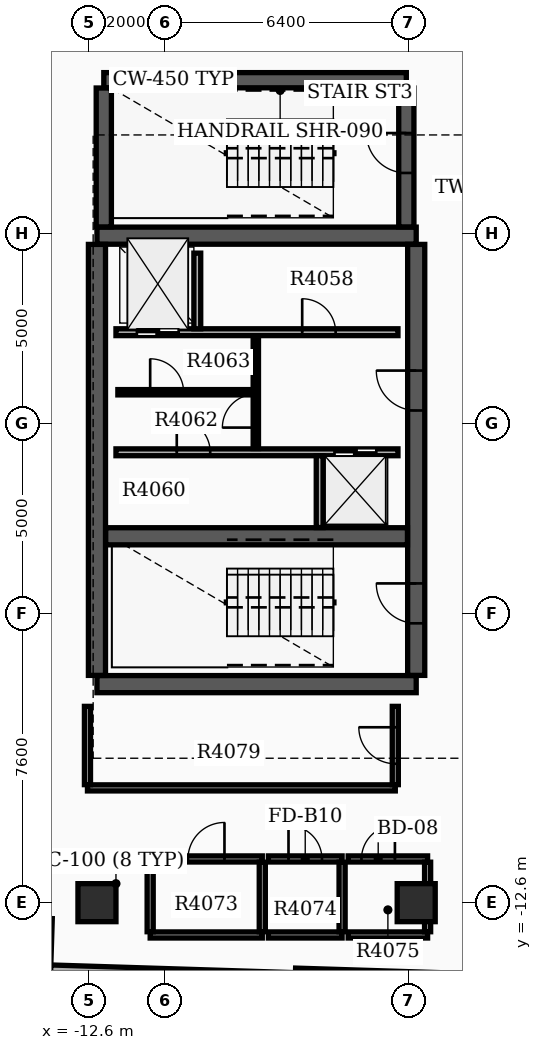
"""IFC4 building model, lengths in metres.
Left out: names, types, materials, properties, quantities, classifications, styles, units other than length and angle.
Written with IfcOpenShell. Run it as: python <this file> out.ifc"""

import sys

from ifc_helpers import new_model, si_unit, direction, frame, frame_2d, origin, origin_2d, place, context, subcontext, project, spatial, rectangle, extrude, element, fill, save


model = new_model("IFC4")
c1 = context("Model", 3, precision=1e-05, world=origin(), true_north=direction((0.0, 1.0)))
c2 = subcontext(c1, "Body", "Model", "MODEL_VIEW")
j1 = project(units=[si_unit("LENGTHUNIT", "METRE"), si_unit("PLANEANGLEUNIT", "RADIAN")], contexts=[c1])
p1 = place(None, origin())
s1 = spatial("IfcSite", under=j1, at=p1, CompositionType="ELEMENT")
p2 = place(p1, origin())
s2 = spatial("IfcBuilding", under=s1, at=p2, CompositionType="ELEMENT")
p3 = place(p2, frame((0.0, 0.0, 257.7)))
s3 = spatial("IfcBuildingStorey", under=s2, at=p3, CompositionType="ELEMENT", Elevation=257.7)
for number, where, z_axis, x_axis in (
    (1, (-12.4, -6.85, 0.0), (0.0, 0.0, 1.0), (1.0, 0.0, 0.0)),
    (2, (-12.4, 4.95, 0.0), (0.0, 0.0, 1.0), (1.0, 0.0, 0.0)),
):
    element("IfcWall", number, at=place(p3, frame(where, z_axis=z_axis, x_axis=x_axis)), inside=s3, PredefinedType="SHEAR", context=c2, shape_type="SweptSolid", body=[
        extrude(rectangle(XDim=8.4, YDim=0.45, at=frame_2d((4.2, 0.0))), origin(), (0.0, 0.0, 1.0), 3.7),
    ])
p4 = place(p3, frame((-12.4, -6.62, 0.0), z_axis=(0.0, 0.0, 1.0), x_axis=(0.0, 1.0, 0.0)))
e3 = element("IfcWall", 3, at=p4, inside=s3, PredefinedType="SHEAR", context=c2, shape_type="SweptSolid", body=[
    extrude(rectangle(XDim=11.34, YDim=0.45, at=frame_2d((5.67, 0.0))), origin(), (0.0, 0.0, 1.0), 3.7),
])
p5 = place(p3, frame((-4.0, -6.62, 0.0), z_axis=(0.0, 0.0, 1.0), x_axis=(0.0, 1.0, 0.0)))
e4 = element("IfcWall", 4, at=p5, inside=s3, PredefinedType="SHEAR", context=c2, shape_type="SweptSolid", body=[
    extrude(rectangle(XDim=11.34, YDim=0.45, at=frame_2d((5.67, 0.0))), origin(), (0.0, 0.0, 1.0), 3.7),
])
p6 = place(p5, frame((1.37, 0.0, 0.0)))
e5 = element("IfcOpeningElement", 5, at=p6, cuts=e4, PredefinedType="OPENING", context=c2, shape_type="SweptSolid", body=[
    extrude(rectangle(XDim=1.05, YDim=2.15, at=frame_2d((0.525, 1.075))), frame((0.0, 0.235, 0.0), z_axis=(0.0, -1.0, 0.0), x_axis=(1.0, 0.0, 0.0)), (0.0, 0.0, 1.0), 0.47),
])
p7 = place(p5, frame((6.97, 0.0, 0.0)))
e6 = element("IfcOpeningElement", 6, at=p7, cuts=e4, PredefinedType="OPENING", context=c2, shape_type="SweptSolid", body=[
    extrude(rectangle(XDim=1.05, YDim=2.15, at=frame_2d((0.525, 1.075))), frame((0.0, 0.235, 0.0), z_axis=(0.0, -1.0, 0.0), x_axis=(1.0, 0.0, 0.0)), (0.0, 0.0, 1.0), 0.47),
])
p8 = place(p3, frame((-12.17, -2.96, 0.0), z_axis=(0.0, 0.0, 1.0), x_axis=(1.0, 0.0, 0.0)))
e7 = element("IfcWall", 7, at=p8, inside=s3, PredefinedType="SHEAR", context=c2, shape_type="SweptSolid", body=[
    extrude(rectangle(XDim=7.94, YDim=0.45, at=frame_2d((3.97, 0.0))), origin(), (0.0, 0.0, 1.0), 3.7),
])
p9 = place(p3, frame((-12.22, 9.04, 0.0), z_axis=(0.0, 0.0, 1.0), x_axis=(1.0, 0.0, 0.0)))
e8 = element("IfcWall", 8, at=p9, inside=s3, PredefinedType="SHEAR", context=c2, shape_type="SweptSolid", body=[
    extrude(rectangle(XDim=7.96, YDim=0.4, at=frame_2d((3.98, 0.0))), origin(), (0.0, 0.0, 1.0), 3.7),
])
p10 = place(p3, frame((-12.22, 5.18, 0.0), z_axis=(0.0, 0.0, 1.0), x_axis=(0.0, 1.0, 0.0)))
e9 = element("IfcWall", 9, at=p10, inside=s3, PredefinedType="SHEAR", context=c2, shape_type="SweptSolid", body=[
    extrude(rectangle(XDim=3.655, YDim=0.4, at=frame_2d((1.828, 0.0))), origin(), (0.0, 0.0, 1.0), 3.7),
])
p11 = place(p3, frame((-4.26, 5.18, 0.0), z_axis=(0.0, 0.0, 1.0), x_axis=(0.0, 1.0, 0.0)))
e10 = element("IfcWall", 10, at=p11, inside=s3, PredefinedType="SHEAR", context=c2, shape_type="SweptSolid", body=[
    extrude(rectangle(XDim=3.655, YDim=0.4, at=frame_2d((1.828, 0.0))), origin(), (0.0, 0.0, 1.0), 3.7),
])
p12 = place(p11, frame((1.42, 0.0, 0.0)))
e11 = element("IfcOpeningElement", 11, at=p12, cuts=e10, PredefinedType="OPENING", context=c2, shape_type="SweptSolid", body=[
    extrude(rectangle(XDim=1.05, YDim=2.15, at=frame_2d((0.525, 1.075))), frame((0.0, 0.21, 0.0), z_axis=(0.0, -1.0, 0.0), x_axis=(1.0, 0.0, 0.0)), (0.0, 0.0, 1.0), 0.42),
])
for number, where, z_axis, x_axis in (
    (12, (-12.4, -12.6, 0.0), (0.0, 0.0, 1.0), (1.0, 0.0, 0.0)),
    (13, (-4.0, -12.6, 0.0), (0.0, 0.0, 1.0), (1.0, 0.0, 0.0)),
):
    element("IfcColumn", number, at=place(p3, frame(where, z_axis=z_axis, x_axis=x_axis)), inside=s3, PredefinedType="COLUMN", context=c2, shape_type="SweptSolid", body=[
        extrude(rectangle(XDim=1.0, YDim=1.0, at=origin_2d()), origin(), (0.0, 0.0, 1.0), 3.9),
    ])
p13 = place(p3, frame((-13.618, -14.379, 0.0), z_axis=(0.0, 0.0, 1.0), x_axis=(0.999507224741, -0.031389611199, 0.0)))
e14 = element("IfcWall", 14, at=p13, inside=s3, PredefinedType="STANDARD", context=c2, shape_type="SweptSolid", body=[
    extrude(rectangle(XDim=6.3, YDim=0.28, at=frame_2d((3.15, 0.0))), origin(), (0.0, 0.0, 1.0), 3.18),
])
p14 = place(p3, frame((-11.9, 2.41, 0.0), z_axis=(0.0, 0.0, 1.0), x_axis=(1.0, 0.0, 0.0)))
e15 = element("IfcWall", 15, at=p14, inside=s3, PredefinedType="SOLIDWALL", context=c2, shape_type="SweptSolid", body=[
    extrude(rectangle(XDim=7.42, YDim=0.18, at=frame_2d((3.71, 0.0))), origin(), (0.0, 0.0, 1.0), 3.17),
])
p15 = place(p14, frame((0.55, 0.0, 0.0)))
e16 = element("IfcOpeningElement", 16, at=p15, cuts=e15, PredefinedType="OPENING", context=c2, shape_type="SweptSolid", body=[
    extrude(rectangle(XDim=1.1, YDim=2.15, at=frame_2d((0.55, 1.075))), frame((0.0, 0.1, 0.0), z_axis=(0.0, -1.0, 0.0), x_axis=(1.0, 0.0, 0.0)), (0.0, 0.0, 1.0), 0.2),
])
p16 = place(p14, frame((4.9, 0.0, 0.0)))
e17 = element("IfcOpeningElement", 17, at=p16, cuts=e15, PredefinedType="OPENING", context=c2, shape_type="SweptSolid", body=[
    extrude(rectangle(XDim=0.88, YDim=2.1, at=frame_2d((0.44, 1.05))), frame((0.0, 0.1, 0.0), z_axis=(0.0, -1.0, 0.0), x_axis=(1.0, 0.0, 0.0)), (0.0, 0.0, 1.0), 0.2),
])
p17 = place(p3, frame((-11.9, -0.75, 0.0), z_axis=(0.0, 0.0, 1.0), x_axis=(1.0, 0.0, 0.0)))
e18 = element("IfcWall", 18, at=p17, inside=s3, PredefinedType="SOLIDWALL", context=c2, shape_type="SweptSolid", body=[
    extrude(rectangle(XDim=7.42, YDim=0.18, at=frame_2d((3.71, 0.0))), origin(), (0.0, 0.0, 1.0), 3.17),
])
p18 = place(p17, frame((5.75, 0.0, 0.0)))
e19 = element("IfcOpeningElement", 19, at=p18, cuts=e18, PredefinedType="OPENING", context=c2, shape_type="SweptSolid", body=[
    extrude(rectangle(XDim=1.1, YDim=2.15, at=frame_2d((0.55, 1.075))), frame((0.0, 0.1, 0.0), z_axis=(0.0, -1.0, 0.0), x_axis=(1.0, 0.0, 0.0)), (0.0, 0.0, 1.0), 0.2),
])
p19 = place(p17, frame((1.6, 0.0, 0.0)))
e20 = element("IfcOpeningElement", 20, at=p19, cuts=e18, PredefinedType="OPENING", context=c2, shape_type="SweptSolid", body=[
    extrude(rectangle(XDim=0.88, YDim=2.1, at=frame_2d((0.44, 1.05))), frame((0.0, 0.1, 0.0), z_axis=(0.0, -1.0, 0.0), x_axis=(1.0, 0.0, 0.0)), (0.0, 0.0, 1.0), 0.2),
])
p20 = place(p3, frame((-9.76, 2.5, 0.0), z_axis=(0.0, 0.0, 1.0), x_axis=(0.0, 1.0, 0.0)))
e21 = element("IfcWall", 21, at=p20, inside=s3, PredefinedType="SOLIDWALL", context=c2, shape_type="SweptSolid", body=[
    extrude(rectangle(XDim=1.99, YDim=0.18, at=frame_2d((0.995, 0.0))), origin(), (0.0, 0.0, 1.0), 3.17),
])
p21 = place(p3, frame((-6.54, -2.73, 0.0), z_axis=(0.0, 0.0, 1.0), x_axis=(0.0, 1.0, 0.0)))
e22 = element("IfcWall", 22, at=p21, inside=s3, PredefinedType="SOLIDWALL", context=c2, shape_type="SweptSolid", body=[
    extrude(rectangle(XDim=1.89, YDim=0.18, at=frame_2d((0.945, 0.0))), origin(), (0.0, 0.0, 1.0), 3.17),
])
p22 = place(p3, frame((-8.22, -0.65, 0.0), z_axis=(0.0, 0.0, 1.0), x_axis=(0.0, 1.0, 0.0)))
e23 = element("IfcWall", 23, at=p22, inside=s3, PredefinedType="SOLIDWALL", context=c2, shape_type="SweptSolid", body=[
    extrude(rectangle(XDim=2.96, YDim=0.14, at=frame_2d((1.48, 0.0))), origin(), (0.0, 0.0, 1.0), 3.17),
])
p23 = place(p22, frame((0.55, 0.0, 0.0)))
e24 = element("IfcOpeningElement", 24, at=p23, cuts=e23, PredefinedType="OPENING", context=c2, shape_type="SweptSolid", body=[
    extrude(rectangle(XDim=0.88, YDim=2.1, at=frame_2d((0.44, 1.05))), frame((0.0, 0.08, 0.0), z_axis=(0.0, -1.0, 0.0), x_axis=(1.0, 0.0, 0.0)), (0.0, 0.0, 1.0), 0.16),
])
p24 = place(p3, frame((-11.85, 0.83, 0.0), z_axis=(0.0, 0.0, 1.0), x_axis=(1.0, 0.0, 0.0)))
e25 = element("IfcWall", 25, at=p24, inside=s3, PredefinedType="PARTITIONING", context=c2, shape_type="SweptSolid", body=[
    extrude(rectangle(XDim=3.552, YDim=0.14, at=frame_2d((1.776, 0.0))), origin(), (0.0, 0.0, 1.0), 3.17),
])
p25 = place(p24, frame((0.85, 0.0, 0.0)))
e26 = element("IfcOpeningElement", 26, at=p25, cuts=e25, PredefinedType="OPENING", context=c2, shape_type="SweptSolid", body=[
    extrude(rectangle(XDim=0.88, YDim=2.1, at=frame_2d((0.44, 1.05))), frame((0.0, 0.08, 0.0), z_axis=(0.0, -1.0, 0.0), x_axis=(1.0, 0.0, 0.0)), (0.0, 0.0, 1.0), 0.16),
])
p26 = place(p3, frame((-11.0, -13.45, 0.0), z_axis=(0.0, 0.0, 1.0), x_axis=(1.0, 0.0, 0.0)))
e27 = element("IfcWall", 27, at=p26, inside=s3, PredefinedType="PARTITIONING", context=c2, shape_type="SweptSolid", body=[
    extrude(rectangle(XDim=2.95, YDim=0.16, at=frame_2d((1.475, 0.0))), origin(), (0.0, 0.0, 1.0), 3.17),
])
p27 = place(p3, frame((-11.0, -11.45, 0.0), z_axis=(0.0, 0.0, 1.0), x_axis=(1.0, 0.0, 0.0)))
e28 = element("IfcWall", 28, at=p27, inside=s3, PredefinedType="PARTITIONING", context=c2, shape_type="SweptSolid", body=[
    extrude(rectangle(XDim=2.95, YDim=0.16, at=frame_2d((1.475, 0.0))), origin(), (0.0, 0.0, 1.0), 3.17),
])
p28 = place(p27, frame((0.995, 0.0, 0.0)))
e29 = element("IfcOpeningElement", 29, at=p28, cuts=e28, PredefinedType="OPENING", context=c2, shape_type="SweptSolid", body=[
    extrude(rectangle(XDim=0.96, YDim=2.15, at=frame_2d((0.48, 1.075))), frame((0.0, 0.09, 0.0), z_axis=(0.0, -1.0, 0.0), x_axis=(1.0, 0.0, 0.0)), (0.0, 0.0, 1.0), 0.18),
])
for number, where, z_axis, x_axis in (
    (30, (-11.0, -13.365, 0.0), (0.0, 0.0, 1.0), (0.0, 1.0, 0.0)),
    (31, (-8.05, -13.365, 0.0), (0.0, 0.0, 1.0), (0.0, 1.0, 0.0)),
):
    element("IfcWall", number, at=place(p3, frame(where, z_axis=z_axis, x_axis=x_axis)), inside=s3, PredefinedType="PARTITIONING", context=c2, shape_type="SweptSolid", body=[
        extrude(rectangle(XDim=1.83, YDim=0.16, at=frame_2d((0.915, 0.0))), origin(), (0.0, 0.0, 1.0), 3.17),
    ])
p29 = place(p3, frame((-7.89, -13.45, 0.0), z_axis=(0.0, 0.0, 1.0), x_axis=(1.0, 0.0, 0.0)))
e32 = element("IfcWall", 32, at=p29, inside=s3, PredefinedType="PARTITIONING", context=c2, shape_type="SweptSolid", body=[
    extrude(rectangle(XDim=1.94, YDim=0.16, at=frame_2d((0.97, 0.0))), origin(), (0.0, 0.0, 1.0), 3.17),
])
p30 = place(p3, frame((-7.89, -11.45, 0.0), z_axis=(0.0, 0.0, 1.0), x_axis=(1.0, 0.0, 0.0)))
e33 = element("IfcWall", 33, at=p30, inside=s3, PredefinedType="PARTITIONING", context=c2, shape_type="SweptSolid", body=[
    extrude(rectangle(XDim=1.94, YDim=0.16, at=frame_2d((0.97, 0.0))), origin(), (0.0, 0.0, 1.0), 3.17),
])
p31 = place(p30, frame((0.53, 0.0, 0.0)))
e34 = element("IfcOpeningElement", 34, at=p31, cuts=e33, PredefinedType="OPENING", context=c2, shape_type="SweptSolid", body=[
    extrude(rectangle(XDim=0.88, YDim=2.1, at=frame_2d((0.44, 1.05))), frame((0.0, 0.09, 0.0), z_axis=(0.0, -1.0, 0.0), x_axis=(1.0, 0.0, 0.0)), (0.0, 0.0, 1.0), 0.18),
])
p32 = place(p3, frame((-5.95, -13.365, 0.0), z_axis=(0.0, 0.0, 1.0), x_axis=(0.0, 1.0, 0.0)))
e35 = element("IfcWall", 35, at=p32, inside=s3, PredefinedType="PARTITIONING", context=c2, shape_type="SweptSolid", body=[
    extrude(rectangle(XDim=1.83, YDim=0.16, at=frame_2d((0.915, 0.0))), origin(), (0.0, 0.0, 1.0), 3.17),
])
p33 = place(p3, frame((-5.79, -13.45, 0.0), z_axis=(0.0, 0.0, 1.0), x_axis=(1.0, 0.0, 0.0)))
e36 = element("IfcWall", 36, at=p33, inside=s3, PredefinedType="PARTITIONING", context=c2, shape_type="SweptSolid", body=[
    extrude(rectangle(XDim=2.09, YDim=0.16, at=frame_2d((1.045, 0.0))), origin(), (0.0, 0.0, 1.0), 3.17),
])
p34 = place(p3, frame((-5.79, -11.45, 0.0), z_axis=(0.0, 0.0, 1.0), x_axis=(1.0, 0.0, 0.0)))
e37 = element("IfcWall", 37, at=p34, inside=s3, PredefinedType="PARTITIONING", context=c2, shape_type="SweptSolid", body=[
    extrude(rectangle(XDim=2.09, YDim=0.16, at=frame_2d((1.045, 0.0))), origin(), (0.0, 0.0, 1.0), 3.17),
])
p35 = place(p34, frame((0.35, 0.0, 0.0)))
e38 = element("IfcOpeningElement", 38, at=p35, cuts=e37, PredefinedType="OPENING", context=c2, shape_type="SweptSolid", body=[
    extrude(rectangle(XDim=0.88, YDim=2.15, at=frame_2d((0.44, 1.075))), frame((0.0, 0.09, 0.0), z_axis=(0.0, -1.0, 0.0), x_axis=(1.0, 0.0, 0.0)), (0.0, 0.0, 1.0), 0.18),
])
p36 = place(p3, frame((-3.7, -13.365, 0.0), z_axis=(0.0, 0.0, 1.0), x_axis=(0.0, 1.0, 0.0)))
e39 = element("IfcWall", 39, at=p36, inside=s3, PredefinedType="PARTITIONING", context=c2, shape_type="SweptSolid", body=[
    extrude(rectangle(XDim=1.83, YDim=0.16, at=frame_2d((0.915, 0.0))), origin(), (0.0, 0.0, 1.0), 3.17),
])
p37 = place(p3, frame((-12.65, -9.58, 0.0), z_axis=(0.0, 0.0, 1.0), x_axis=(1.0, 0.0, 0.0)))
e40 = element("IfcWall", 40, at=p37, inside=s3, PredefinedType="PARTITIONING", context=c2, shape_type="SweptSolid", body=[
    extrude(rectangle(XDim=8.1, YDim=0.16, at=frame_2d((4.05, 0.0))), origin(), (0.0, 0.0, 1.0), 3.17),
])
p38 = place(p3, frame((-12.65, -9.495, 0.0), z_axis=(0.0, 0.0, 1.0), x_axis=(0.0, 1.0, 0.0)))
e41 = element("IfcWall", 41, at=p38, inside=s3, PredefinedType="PARTITIONING", context=c2, shape_type="SweptSolid", body=[
    extrude(rectangle(XDim=2.06, YDim=0.16, at=frame_2d((1.03, 0.0))), origin(), (0.0, 0.0, 1.0), 3.17),
])
p39 = place(p3, frame((-4.55, -9.495, 0.0), z_axis=(0.0, 0.0, 1.0), x_axis=(0.0, 1.0, 0.0)))
e42 = element("IfcWall", 42, at=p39, inside=s3, PredefinedType="PARTITIONING", context=c2, shape_type="SweptSolid", body=[
    extrude(rectangle(XDim=2.06, YDim=0.16, at=frame_2d((1.03, 0.0))), origin(), (0.0, 0.0, 1.0), 3.17),
])
p40 = place(p39, frame((0.55, 0.0, 0.0)))
e43 = element("IfcOpeningElement", 43, at=p40, cuts=e42, PredefinedType="OPENING", context=c2, shape_type="SweptSolid", body=[
    extrude(rectangle(XDim=0.96, YDim=2.15, at=frame_2d((0.48, 1.075))), frame((0.0, 0.09, 0.0), z_axis=(0.0, -1.0, 0.0), x_axis=(1.0, 0.0, 0.0)), (0.0, 0.0, 1.0), 0.18),
])
p41 = place(p3, frame((-1.659, -14.575, 0.0), z_axis=(0.0, 0.0, 1.0), x_axis=(-0.999505408206, 0.031447400002, 0.0)))
e44 = element("IfcWall", 44, at=p41, inside=s3, PredefinedType="PARTITIONING", context=c2, shape_type="SweptSolid", body=[
    extrude(rectangle(XDim=5.52, YDim=0.16, at=frame_2d((2.76, 0.0))), origin(), (0.0, 0.0, 1.0), 3.17),
])
p42 = place(p6, origin())
e45 = element("IfcDoor", 45, at=p42, inside=s3, OperationType="SINGLE_SWING_RIGHT", PredefinedType="DOOR", context=c2, shape_type="SweptSolid", body=[
    extrude(rectangle(XDim=1.05, YDim=2.15, at=frame_2d((0.525, 1.075))), frame((0.0, 0.025, 0.0), z_axis=(0.0, -1.0, 0.0), x_axis=(1.0, 0.0, 0.0)), (0.0, 0.0, 1.0), 0.05),
])
fill(e5, e45)
p43 = place(p7, origin())
e46 = element("IfcDoor", 46, at=p43, inside=s3, OperationType="SINGLE_SWING_RIGHT", PredefinedType="DOOR", context=c2, shape_type="SweptSolid", body=[
    extrude(rectangle(XDim=1.05, YDim=2.15, at=frame_2d((0.525, 1.075))), frame((0.0, 0.025, 0.0), z_axis=(0.0, -1.0, 0.0), x_axis=(1.0, 0.0, 0.0)), (0.0, 0.0, 1.0), 0.05),
])
fill(e6, e46)
p44 = place(p12, origin())
e47 = element("IfcDoor", 47, at=p44, inside=s3, OperationType="SINGLE_SWING_RIGHT", PredefinedType="DOOR", context=c2, shape_type="SweptSolid", body=[
    extrude(rectangle(XDim=1.05, YDim=2.15, at=frame_2d((0.525, 1.075))), frame((0.0, 0.025, 0.0), z_axis=(0.0, -1.0, 0.0), x_axis=(1.0, 0.0, 0.0)), (0.0, 0.0, 1.0), 0.05),
])
fill(e11, e47)
p45 = place(p15, origin())
e48 = element("IfcDoor", 48, at=p45, inside=s3, OperationType="DOUBLE_DOOR_SLIDING", PredefinedType="DOOR", context=c2, shape_type="SweptSolid", body=[
    extrude(rectangle(XDim=1.1, YDim=2.15, at=frame_2d((0.55, 1.075))), frame((0.0, 0.025, 0.0), z_axis=(0.0, -1.0, 0.0), x_axis=(1.0, 0.0, 0.0)), (0.0, 0.0, 1.0), 0.05),
])
fill(e16, e48)
p46 = place(p18, origin())
e49 = element("IfcDoor", 49, at=p46, inside=s3, OperationType="DOUBLE_DOOR_SLIDING", PredefinedType="DOOR", context=c2, shape_type="SweptSolid", body=[
    extrude(rectangle(XDim=1.1, YDim=2.15, at=frame_2d((0.55, 1.075))), frame((0.0, 0.025, 0.0), z_axis=(0.0, -1.0, 0.0), x_axis=(1.0, 0.0, 0.0)), (0.0, 0.0, 1.0), 0.05),
])
fill(e19, e49)
p47 = place(p16, origin())
e50 = element("IfcDoor", 50, at=p47, inside=s3, OperationType="SINGLE_SWING_LEFT", PredefinedType="DOOR", context=c2, shape_type="SweptSolid", body=[
    extrude(rectangle(XDim=0.88, YDim=2.1, at=frame_2d((0.44, 1.05))), frame((0.0, 0.025, 0.0), z_axis=(0.0, -1.0, 0.0), x_axis=(1.0, 0.0, 0.0)), (0.0, 0.0, 1.0), 0.05),
])
fill(e17, e50)
p48 = place(p19, origin())
e51 = element("IfcDoor", 51, at=p48, inside=s3, OperationType="SINGLE_SWING_LEFT", PredefinedType="DOOR", context=c2, shape_type="SweptSolid", body=[
    extrude(rectangle(XDim=0.88, YDim=2.1, at=frame_2d((0.44, 1.05))), frame((0.0, 0.025, 0.0), z_axis=(0.0, -1.0, 0.0), x_axis=(1.0, 0.0, 0.0)), (0.0, 0.0, 1.0), 0.05),
])
fill(e20, e51)
p49 = place(p23, origin())
e52 = element("IfcDoor", 52, at=p49, inside=s3, OperationType="SINGLE_SWING_LEFT", PredefinedType="DOOR", context=c2, shape_type="SweptSolid", body=[
    extrude(rectangle(XDim=0.88, YDim=2.1, at=frame_2d((0.44, 1.05))), frame((0.0, 0.025, 0.0), z_axis=(0.0, -1.0, 0.0), x_axis=(1.0, 0.0, 0.0)), (0.0, 0.0, 1.0), 0.05),
])
fill(e24, e52)
p50 = place(p25, origin())
e53 = element("IfcDoor", 53, at=p50, inside=s3, OperationType="SINGLE_SWING_LEFT", PredefinedType="DOOR", context=c2, shape_type="SweptSolid", body=[
    extrude(rectangle(XDim=0.88, YDim=2.1, at=frame_2d((0.44, 1.05))), frame((0.0, 0.025, 0.0), z_axis=(0.0, -1.0, 0.0), x_axis=(1.0, 0.0, 0.0)), (0.0, 0.0, 1.0), 0.05),
])
fill(e26, e53)
p51 = place(p28, origin())
e54 = element("IfcDoor", 54, at=p51, inside=s3, OperationType="SINGLE_SWING_RIGHT", PredefinedType="DOOR", context=c2, shape_type="SweptSolid", body=[
    extrude(rectangle(XDim=0.96, YDim=2.15, at=frame_2d((0.48, 1.075))), frame((0.0, 0.025, 0.0), z_axis=(0.0, -1.0, 0.0), x_axis=(1.0, 0.0, 0.0)), (0.0, 0.0, 1.0), 0.05),
])
fill(e29, e54)
p52 = place(p31, origin())
e55 = element("IfcDoor", 55, at=p52, inside=s3, OperationType="SINGLE_SWING_LEFT", PredefinedType="DOOR", context=c2, shape_type="SweptSolid", body=[
    extrude(rectangle(XDim=0.88, YDim=2.1, at=frame_2d((0.44, 1.05))), frame((0.0, 0.025, 0.0), z_axis=(0.0, -1.0, 0.0), x_axis=(1.0, 0.0, 0.0)), (0.0, 0.0, 1.0), 0.05),
])
fill(e34, e55)
p53 = place(p35, origin())
e56 = element("IfcDoor", 56, at=p53, inside=s3, OperationType="SINGLE_SWING_RIGHT", PredefinedType="DOOR", context=c2, shape_type="SweptSolid", body=[
    extrude(rectangle(XDim=0.88, YDim=2.15, at=frame_2d((0.44, 1.075))), frame((0.0, 0.025, 0.0), z_axis=(0.0, -1.0, 0.0), x_axis=(1.0, 0.0, 0.0)), (0.0, 0.0, 1.0), 0.05),
])
fill(e38, e56)
p54 = place(p40, origin())
e57 = element("IfcDoor", 57, at=p54, inside=s3, OperationType="SINGLE_SWING_RIGHT", PredefinedType="DOOR", context=c2, shape_type="SweptSolid", body=[
    extrude(rectangle(XDim=0.96, YDim=2.15, at=frame_2d((0.48, 1.075))), frame((0.0, 0.025, 0.0), z_axis=(0.0, -1.0, 0.0), x_axis=(1.0, 0.0, 0.0)), (0.0, 0.0, 1.0), 0.05),
])
fill(e43, e57)
save(model, sys.argv[1])
